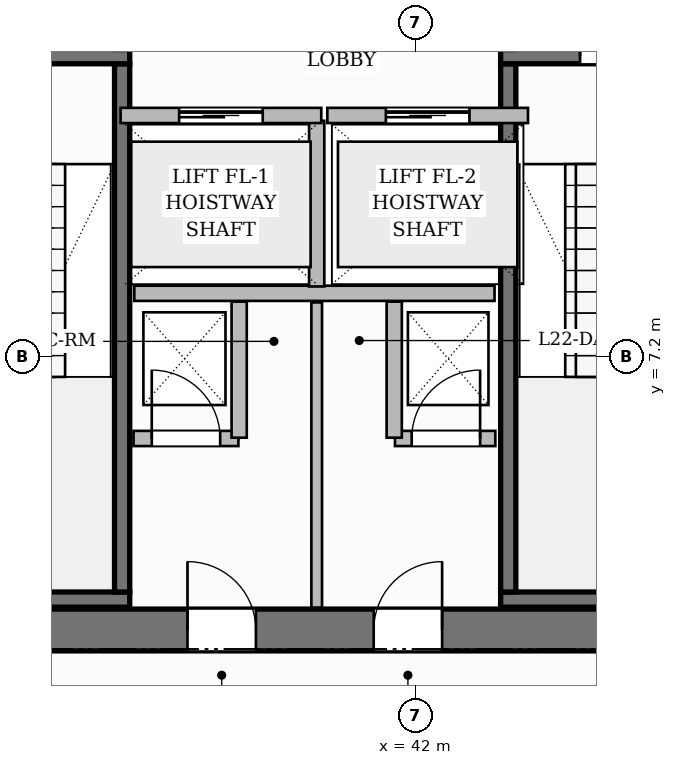
"""IFC4 building model, lengths in metres.
Left out: names, types, materials, properties, quantities, classifications, styles, units other than length and angle.
Written with IfcOpenShell. Run it as: python <this file> out.ifc"""

import sys

from ifc_helpers import new_model, si_unit, direction, frame, frame_2d, origin, place, context, subcontext, project, spatial, rectangle, extrude, source, transform, mapped, element, fill, save


model = new_model("IFC4")
c1 = context("Model", 3, precision=1e-05, world=origin(), true_north=direction((0.0, 1.0)))
c2 = subcontext(c1, "Body", "Model", "MODEL_VIEW")
j1 = project(units=[si_unit("LENGTHUNIT", "METRE"), si_unit("PLANEANGLEUNIT", "RADIAN")], contexts=[c1])
p1 = place(None, origin())
s1 = spatial("IfcSite", under=j1, at=p1, CompositionType="ELEMENT")
p2 = place(p1, origin())
s2 = spatial("IfcBuilding", under=s1, at=p2, CompositionType="ELEMENT")
p3 = place(p2, frame((0.0, 0.0, 91.6)))
s3 = spatial("IfcBuildingStorey", under=s2, at=p3, CompositionType="ELEMENT", Elevation=91.6)
p4 = place(p3, frame((34.525, 3.6, 0.0), z_axis=(0.0, 0.0, 1.0), x_axis=(1.0, 0.0, 0.0)))
e1 = element("IfcWall", 1, at=p4, inside=s3, PredefinedType="SHEAR", context=c2, shape_type="SweptSolid", body=[
    extrude(rectangle(XDim=15.55, YDim=0.55, at=frame_2d((7.775, 0.0))), origin(), (0.0, 0.0, 1.0), 3.7),
])
p5 = place(p4, frame((4.475, 0.0, 0.0)))
e2 = element("IfcOpeningElement", 2, at=p5, cuts=e1, PredefinedType="OPENING", context=c2, shape_type="SweptSolid", body=[
    extrude(rectangle(XDim=0.9, YDim=2.1, at=frame_2d((0.45, 1.05))), frame((0.0, 0.285, 0.0), z_axis=(0.0, -1.0, 0.0), x_axis=(1.0, 0.0, 0.0)), (0.0, 0.0, 1.0), 0.57),
])
p6 = place(p4, frame((6.925, 0.0, 0.0)))
e3 = element("IfcOpeningElement", 3, at=p6, cuts=e1, PredefinedType="OPENING", context=c2, shape_type="SweptSolid", body=[
    extrude(rectangle(XDim=0.9, YDim=2.1, at=frame_2d((0.45, 1.05))), frame((0.0, 0.285, 0.0), z_axis=(0.0, -1.0, 0.0), x_axis=(1.0, 0.0, 0.0)), (0.0, 0.0, 1.0), 0.57),
])
p7 = place(p3, frame((35.075, 4.0, 0.0), z_axis=(0.0, 0.0, 1.0), x_axis=(1.0, 0.0, 0.0)))
e4 = element("IfcWall", 4, at=p7, inside=s3, PredefinedType="SHEAR", context=c2, shape_type="SweptSolid", body=[
    extrude(rectangle(XDim=3.165, YDim=0.2, at=frame_2d((1.583, 0.0))), origin(), (0.0, 0.0, 1.0), 3.7),
])
p8 = place(p3, frame((38.14, 4.1, 0.0), z_axis=(0.0, 0.0, 1.0), x_axis=(0.0, 1.0, 0.0)))
e5 = element("IfcWall", 5, at=p8, inside=s3, PredefinedType="SHEAR", context=c2, shape_type="SweptSolid", body=[
    extrude(rectangle(XDim=6.95, YDim=0.2, at=frame_2d((3.475, 0.0))), origin(), (0.0, 0.0, 1.0), 3.7),
])
p9 = place(p3, frame((35.075, 11.15, 0.0), z_axis=(0.0, 0.0, 1.0), x_axis=(1.0, 0.0, 0.0)))
e6 = element("IfcWall", 6, at=p9, inside=s3, PredefinedType="SHEAR", context=c2, shape_type="SweptSolid", body=[
    extrude(rectangle(XDim=3.165, YDim=0.2, at=frame_2d((1.583, 0.0))), origin(), (0.0, 0.0, 1.0), 3.7),
])
p10 = place(p9, frame((1.07, 0.0, 0.0)))
e7 = element("IfcOpeningElement", 7, at=p10, cuts=e6, PredefinedType="OPENING", context=c2, shape_type="SweptSolid", body=[
    extrude(rectangle(XDim=1.05, YDim=2.2, at=frame_2d((0.525, 1.1))), frame((0.0, 0.11, 0.0), z_axis=(0.0, -1.0, 0.0), x_axis=(1.0, 0.0, 0.0)), (0.0, 0.0, 1.0), 0.22),
])
p11 = place(p3, frame((43.12, 4.0, 0.0), z_axis=(0.0, 0.0, 1.0), x_axis=(1.0, 0.0, 0.0)))
e8 = element("IfcWall", 8, at=p11, inside=s3, PredefinedType="SHEAR", context=c2, shape_type="SweptSolid", body=[
    extrude(rectangle(XDim=6.405, YDim=0.2, at=frame_2d((3.202, 0.0))), origin(), (0.0, 0.0, 1.0), 3.7),
])
p12 = place(p3, frame((43.22, 4.1, 0.0), z_axis=(0.0, 0.0, 1.0), x_axis=(0.0, 1.0, 0.0)))
e9 = element("IfcWall", 9, at=p12, inside=s3, PredefinedType="SHEAR", context=c2, shape_type="SweptSolid", body=[
    extrude(rectangle(XDim=6.95, YDim=0.2, at=frame_2d((3.475, 0.0))), origin(), (0.0, 0.0, 1.0), 3.7),
])
p13 = place(p3, frame((43.12, 11.15, 0.0), z_axis=(0.0, 0.0, 1.0), x_axis=(1.0, 0.0, 0.0)))
e10 = element("IfcWall", 10, at=p13, inside=s3, PredefinedType="SHEAR", context=c2, shape_type="SweptSolid", body=[
    extrude(rectangle(XDim=6.405, YDim=0.2, at=frame_2d((3.202, 0.0))), origin(), (0.0, 0.0, 1.0), 3.7),
])
p14 = place(p13, frame((1.045, 0.0, 0.0)))
e11 = element("IfcOpeningElement", 11, at=p14, cuts=e10, PredefinedType="OPENING", context=c2, shape_type="SweptSolid", body=[
    extrude(rectangle(XDim=1.05, YDim=2.2, at=frame_2d((0.525, 1.1))), frame((0.0, 0.11, 0.0), z_axis=(0.0, -1.0, 0.0), x_axis=(1.0, 0.0, 0.0)), (0.0, 0.0, 1.0), 0.22),
])
p15 = place(p13, frame((4.125, 0.0, 0.0)))
e12 = element("IfcOpeningElement", 12, at=p15, cuts=e10, PredefinedType="OPENING", context=c2, shape_type="SweptSolid", body=[
    extrude(rectangle(XDim=1.05, YDim=2.2, at=frame_2d((0.525, 1.1))), frame((0.0, 0.11, 0.0), z_axis=(0.0, -1.0, 0.0), x_axis=(1.0, 0.0, 0.0)), (0.0, 0.0, 1.0), 0.22),
])
p16 = place(p3, frame((38.3, 8.03, 0.0), z_axis=(0.0, 0.0, 1.0), x_axis=(1.0, 0.0, 0.0)))
e13 = element("IfcWall", 13, at=p16, inside=s3, PredefinedType="PARTITIONING", context=c2, shape_type="SweptSolid", body=[
    extrude(rectangle(XDim=4.74, YDim=0.2, at=frame_2d((2.37, 0.0))), origin(), (0.0, 0.0, 1.0), 3.45),
])
p17 = place(p3, frame((40.7, 8.12, 0.0), z_axis=(0.0, 0.0, 1.0), x_axis=(0.0, 1.0, 0.0)))
e14 = element("IfcWall", 14, at=p17, inside=s3, PredefinedType="PARTITIONING", context=c2, shape_type="SweptSolid", body=[
    extrude(rectangle(XDim=2.18, YDim=0.2, at=frame_2d((1.09, 0.0))), origin(), (0.0, 0.0, 1.0), 3.45),
])
p18 = place(p3, frame((38.29, 6.12, 0.0), z_axis=(0.0, 0.0, 1.0), x_axis=(1.0, 0.0, 0.0)))
e15 = element("IfcWall", 15, at=p18, inside=s3, PredefinedType="PARTITIONING", context=c2, shape_type="SweptSolid", body=[
    extrude(rectangle(XDim=1.38, YDim=0.2, at=frame_2d((0.69, 0.0))), origin(), (0.0, 0.0, 1.0), 3.45),
])
p19 = place(p18, frame((0.24, 0.0, 0.0)))
e16 = element("IfcOpeningElement", 16, at=p19, cuts=e15, PredefinedType="OPENING", context=c2, shape_type="SweptSolid", body=[
    extrude(rectangle(XDim=0.9, YDim=2.1, at=frame_2d((0.45, 1.05))), frame((0.0, 0.11, 0.0), z_axis=(0.0, -1.0, 0.0), x_axis=(1.0, 0.0, 0.0)), (0.0, 0.0, 1.0), 0.22),
])
p20 = place(p3, frame((39.68, 6.13, 0.0), z_axis=(0.0, 0.0, 1.0), x_axis=(0.0, 1.0, 0.0)))
e17 = element("IfcWall", 17, at=p20, inside=s3, PredefinedType="PARTITIONING", context=c2, shape_type="SweptSolid", body=[
    extrude(rectangle(XDim=1.79, YDim=0.2, at=frame_2d((0.895, 0.0))), origin(), (0.0, 0.0, 1.0), 3.45),
])
p21 = place(p3, frame((41.73, 6.12, 0.0), z_axis=(0.0, 0.0, 1.0), x_axis=(1.0, 0.0, 0.0)))
e18 = element("IfcWall", 18, at=p21, inside=s3, PredefinedType="PARTITIONING", context=c2, shape_type="SweptSolid", body=[
    extrude(rectangle(XDim=1.32, YDim=0.2, at=frame_2d((0.66, 0.0))), origin(), (0.0, 0.0, 1.0), 3.45),
])
p22 = place(p21, frame((0.22, 0.0, 0.0)))
e19 = element("IfcOpeningElement", 19, at=p22, cuts=e18, PredefinedType="OPENING", context=c2, shape_type="SweptSolid", body=[
    extrude(rectangle(XDim=0.9, YDim=2.1, at=frame_2d((0.45, 1.05))), frame((0.0, 0.11, 0.0), z_axis=(0.0, -1.0, 0.0), x_axis=(1.0, 0.0, 0.0)), (0.0, 0.0, 1.0), 0.22),
])
p23 = place(p3, frame((41.72, 6.13, 0.0), z_axis=(0.0, 0.0, 1.0), x_axis=(0.0, 1.0, 0.0)))
e20 = element("IfcWall", 20, at=p23, inside=s3, PredefinedType="PARTITIONING", context=c2, shape_type="SweptSolid", body=[
    extrude(rectangle(XDim=1.79, YDim=0.2, at=frame_2d((0.895, 0.0))), origin(), (0.0, 0.0, 1.0), 3.45),
])
p24 = place(p3, frame((40.7, 3.895, 0.0), z_axis=(0.0, 0.0, 1.0), x_axis=(0.0, 1.0, 0.0)))
e21 = element("IfcWall", 21, at=p24, inside=s3, PredefinedType="PARTITIONING", context=c2, shape_type="SweptSolid", body=[
    extrude(rectangle(XDim=4.015, YDim=0.14, at=frame_2d((2.007, 0.0))), origin(), (0.0, 0.0, 1.0), 3.45),
])
p25 = place(p3, frame((38.12, 10.37, 0.0), z_axis=(0.0, 0.0, 1.0), x_axis=(1.0, 0.0, 0.0)))
e22 = element("IfcWall", 22, at=p25, inside=s3, PredefinedType="PARTITIONING", context=c2, shape_type="SweptSolid", body=[
    extrude(rectangle(XDim=2.64, YDim=0.2, at=frame_2d((1.32, 0.0))), origin(), (0.0, 0.0, 1.0), 3.45),
])
p26 = place(p25, frame((0.77, 0.0, 0.0)))
e23 = element("IfcOpeningElement", 23, at=p26, cuts=e22, PredefinedType="OPENING", context=c2, shape_type="SweptSolid", body=[
    extrude(rectangle(XDim=1.1, YDim=2.2, at=frame_2d((0.55, 1.1))), frame((0.0, 0.11, 0.0), z_axis=(0.0, -1.0, 0.0), x_axis=(1.0, 0.0, 0.0)), (0.0, 0.0, 1.0), 0.22),
])
p27 = place(p3, frame((40.84, 10.37, 0.0), z_axis=(0.0, 0.0, 1.0), x_axis=(1.0, 0.0, 0.0)))
e24 = element("IfcWall", 24, at=p27, inside=s3, PredefinedType="PARTITIONING", context=c2, shape_type="SweptSolid", body=[
    extrude(rectangle(XDim=2.64, YDim=0.2, at=frame_2d((1.32, 0.0))), origin(), (0.0, 0.0, 1.0), 3.45),
])
p28 = place(p27, frame((0.77, 0.0, 0.0)))
e25 = element("IfcOpeningElement", 25, at=p28, cuts=e24, PredefinedType="OPENING", context=c2, shape_type="SweptSolid", body=[
    extrude(rectangle(XDim=1.1, YDim=2.2, at=frame_2d((0.55, 1.1))), frame((0.0, 0.11, 0.0), z_axis=(0.0, -1.0, 0.0), x_axis=(1.0, 0.0, 0.0)), (0.0, 0.0, 1.0), 0.22),
])
m1 = source(origin(), c2, "Body", "SweptSolid", [
    extrude(rectangle(XDim=1.05, YDim=2.2, at=frame_2d((0.525, 1.1))), frame((0.0, 0.025, 0.0), z_axis=(0.0, -1.0, 0.0), x_axis=(1.0, 0.0, 0.0)), (0.0, 0.0, 1.0), 0.05),
])
p29 = place(p14, origin())
e26 = element("IfcDoor", 26, at=p29, inside=s3, OperationType="SINGLE_SWING_LEFT", PredefinedType="DOOR", context=c2, shape_type="MappedRepresentation", body=[
    mapped(m1, transform((0.0, 0.0, 0.0), scale=1.0)),
])
fill(e11, e26)
m2 = source(origin(), c2, "Body", "SweptSolid", [
    extrude(rectangle(XDim=0.9, YDim=2.1, at=frame_2d((0.45, 1.05))), frame((0.0, 0.025, 0.0), z_axis=(0.0, -1.0, 0.0), x_axis=(1.0, 0.0, 0.0)), (0.0, 0.0, 1.0), 0.05),
])
p30 = place(p19, origin())
e27 = element("IfcDoor", 27, at=p30, inside=s3, OperationType="SINGLE_SWING_LEFT", PredefinedType="DOOR", context=c2, shape_type="MappedRepresentation", body=[
    mapped(m2, transform((0.0, 0.0, 0.0), scale=1.0)),
])
fill(e16, e27)
p31 = place(p22, origin())
e28 = element("IfcDoor", 28, at=p31, inside=s3, OperationType="SINGLE_SWING_RIGHT", PredefinedType="DOOR", context=c2, shape_type="MappedRepresentation", body=[
    mapped(m2, transform((0.0, 0.0, 0.0), scale=1.0)),
])
fill(e19, e28)
p32 = place(p5, origin())
e29 = element("IfcDoor", 29, at=p32, inside=s3, OperationType="SINGLE_SWING_LEFT", PredefinedType="DOOR", context=c2, shape_type="MappedRepresentation", body=[
    mapped(m2, transform((0.0, 0.0, 0.0), scale=1.0)),
])
fill(e2, e29)
p33 = place(p6, origin())
e30 = element("IfcDoor", 30, at=p33, inside=s3, OperationType="SINGLE_SWING_RIGHT", PredefinedType="DOOR", context=c2, shape_type="MappedRepresentation", body=[
    mapped(m2, transform((0.0, 0.0, 0.0), scale=1.0)),
])
fill(e3, e30)
m3 = source(origin(), c2, "Body", "SweptSolid", [
    extrude(rectangle(XDim=1.1, YDim=2.2, at=frame_2d((0.55, 1.1))), frame((0.0, 0.025, 0.0), z_axis=(0.0, -1.0, 0.0), x_axis=(1.0, 0.0, 0.0)), (0.0, 0.0, 1.0), 0.05),
])
p34 = place(p26, origin())
e31 = element("IfcDoor", 31, at=p34, inside=s3, OperationType="SLIDING_TO_LEFT", PredefinedType="DOOR", context=c2, shape_type="MappedRepresentation", body=[
    mapped(m3, transform((0.0, 0.0, 0.0), scale=1.0)),
])
fill(e23, e31)
p35 = place(p28, origin())
e32 = element("IfcDoor", 32, at=p35, inside=s3, OperationType="SLIDING_TO_LEFT", PredefinedType="DOOR", context=c2, shape_type="MappedRepresentation", body=[
    mapped(m3, transform((0.0, 0.0, 0.0), scale=1.0)),
])
fill(e25, e32)
save(model, sys.argv[1])
